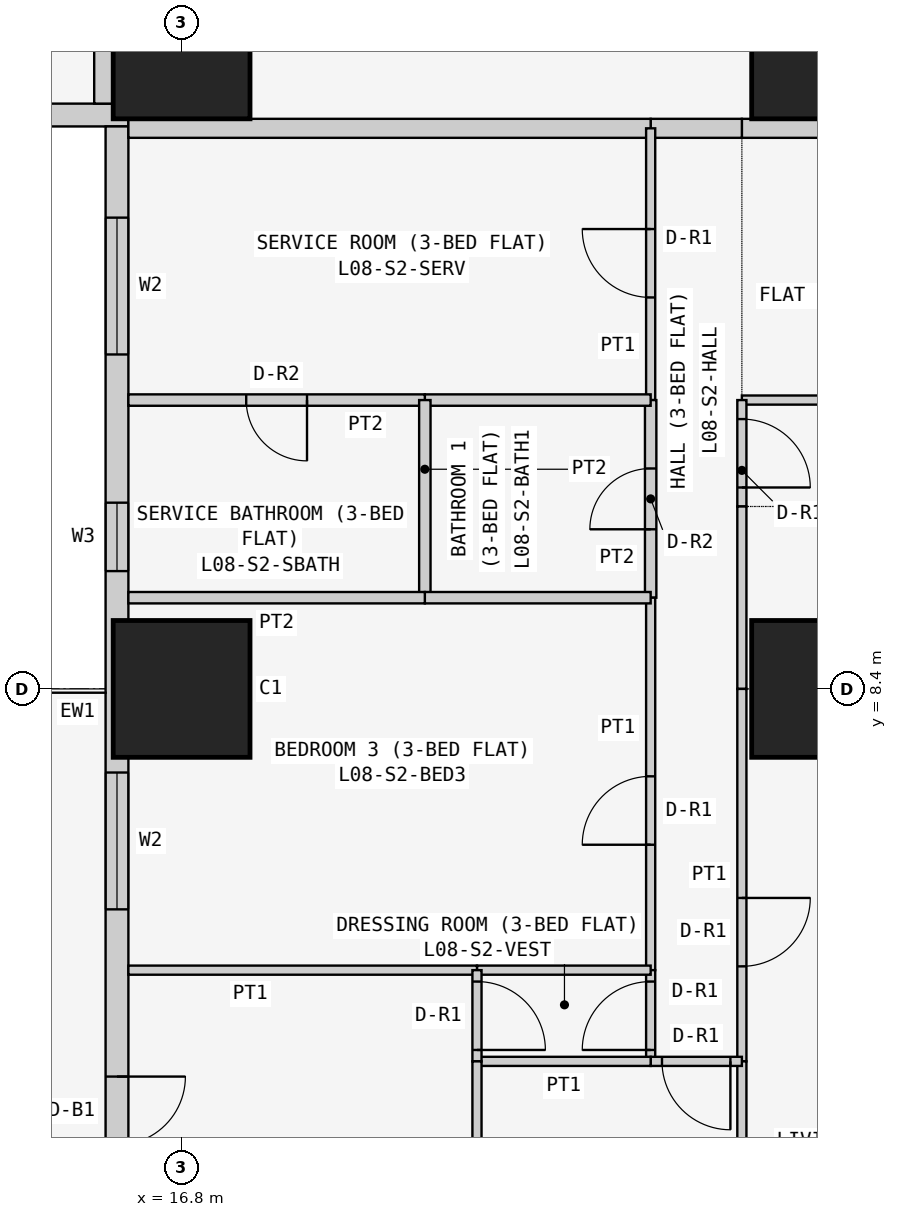
"""IFC4 building model, lengths in metres.
Left out: names, types, materials, properties, quantities, classifications, styles, units other than length and angle.
Written with IfcOpenShell. Run it as: python <this file> out.ifc"""

import sys

from ifc_helpers import new_model, si_unit, direction, frame, frame_2d, origin, origin_2d, place, context, subcontext, project, spatial, rectangle, extrude, element, fill, save


model = new_model("IFC4")
c1 = context("Model", 3, precision=1e-05, world=origin(), true_north=direction((0.0, 1.0)))
c2 = subcontext(c1, "Body", "Model", "MODEL_VIEW")
j1 = project(units=[si_unit("LENGTHUNIT", "METRE"), si_unit("PLANEANGLEUNIT", "RADIAN")], contexts=[c1])
p1 = place(None, origin())
s1 = spatial("IfcSite", under=j1, at=p1, CompositionType="ELEMENT")
p2 = place(p1, origin())
s2 = spatial("IfcBuilding", under=s1, at=p2, CompositionType="ELEMENT")
p3 = place(p2, frame((0.0, 0.0, 38.1)))
s3 = spatial("IfcBuildingStorey", under=s2, at=p3, CompositionType="ELEMENT", Elevation=38.1)
for number, where, z_axis, x_axis in (
    (1, (16.8, 8.4, 0.0), (0.0, 0.0, 1.0), (1.0, 0.0, 0.0)),
    (2, (16.8, 16.8, 0.0), (0.0, 0.0, 1.0), (1.0, 0.0, 0.0)),
    (3, (25.2, 8.4, 0.0), (0.0, 0.0, 1.0), (1.0, 0.0, 0.0)),
    (4, (25.2, 16.8, 0.0), (0.0, 0.0, 1.0), (1.0, 0.0, 0.0)),
):
    element("IfcColumn", number, at=place(p3, frame(where, z_axis=z_axis, x_axis=x_axis)), inside=s3, PredefinedType="COLUMN", context=c2, shape_type="SweptSolid", body=[
        extrude(rectangle(XDim=1.8, YDim=1.8, at=origin_2d()), origin(), (0.0, 0.0, 1.0), 3.6),
    ])
p4 = place(p3, frame((0.4, 15.95, 0.0), z_axis=(0.0, 0.0, 1.0), x_axis=(1.0, 0.0, 0.0)))
e5 = element("IfcWall", 5, at=p4, inside=s3, PredefinedType="SOLIDWALL", context=c2, shape_type="SweptSolid", body=[
    extrude(rectangle(XDim=15.7, YDim=0.3, at=frame_2d((7.85, 0.0))), origin(), (0.0, 0.0, 1.0), 3.45),
])
p5 = place(p4, frame((12.4, 0.0, 0.9)))
e6 = element("IfcOpeningElement", 6, at=p5, cuts=e5, PredefinedType="OPENING", context=c2, shape_type="SweptSolid", body=[
    extrude(rectangle(XDim=1.8, YDim=1.5, at=frame_2d((0.9, 0.75))), frame((0.0, 0.16, 0.0), z_axis=(0.0, -1.0, 0.0), x_axis=(1.0, 0.0, 0.0)), (0.0, 0.0, 1.0), 0.32),
])
p6 = place(p4, frame((9.55, 0.0, 1.5)))
e7 = element("IfcOpeningElement", 7, at=p6, cuts=e5, PredefinedType="OPENING", context=c2, shape_type="SweptSolid", body=[
    extrude(rectangle(XDim=0.9, YDim=0.7, at=frame_2d((0.45, 0.35))), frame((0.0, 0.16, 0.0), z_axis=(0.0, -1.0, 0.0), x_axis=(1.0, 0.0, 0.0)), (0.0, 0.0, 1.0), 0.32),
])
p7 = place(p4, frame((5.1, 0.0, 0.9)))
e8 = element("IfcOpeningElement", 8, at=p7, cuts=e5, PredefinedType="OPENING", context=c2, shape_type="SweptSolid", body=[
    extrude(rectangle(XDim=1.8, YDim=1.5, at=frame_2d((0.9, 0.75))), frame((0.0, 0.16, 0.0), z_axis=(0.0, -1.0, 0.0), x_axis=(1.0, 0.0, 0.0)), (0.0, 0.0, 1.0), 0.32),
])
p8 = place(p4, frame((2.0, 0.0, 0.0)))
e9 = element("IfcOpeningElement", 9, at=p8, cuts=e5, PredefinedType="OPENING", context=c2, shape_type="SweptSolid", body=[
    extrude(rectangle(XDim=0.9, YDim=2.4, at=frame_2d((0.45, 1.2))), frame((0.0, 0.16, 0.0), z_axis=(0.0, -1.0, 0.0), x_axis=(1.0, 0.0, 0.0)), (0.0, 0.0, 1.0), 0.32),
])
p9 = place(p4, frame((0.7, 0.0, 0.9)))
e10 = element("IfcOpeningElement", 10, at=p9, cuts=e5, PredefinedType="OPENING", context=c2, shape_type="SweptSolid", body=[
    extrude(rectangle(XDim=1.2, YDim=1.5, at=frame_2d((0.6, 0.75))), frame((0.0, 0.16, 0.0), z_axis=(0.0, -1.0, 0.0), x_axis=(1.0, 0.0, 0.0)), (0.0, 0.0, 1.0), 0.32),
])
p10 = place(p3, frame((15.95, 15.8, 0.0), z_axis=(0.0, 0.0, 1.0), x_axis=(0.0, -1.0, 0.0)))
e11 = element("IfcWall", 11, at=p10, inside=s3, PredefinedType="SOLIDWALL", context=c2, shape_type="SweptSolid", body=[
    extrude(rectangle(XDim=15.4, YDim=0.3, at=frame_2d((7.7, 0.0))), origin(), (0.0, 0.0, 1.0), 3.45),
])
p11 = place(p10, frame((1.2, 0.0, 0.9)))
e12 = element("IfcOpeningElement", 12, at=p11, cuts=e11, PredefinedType="OPENING", context=c2, shape_type="SweptSolid", body=[
    extrude(rectangle(XDim=1.8, YDim=1.5, at=frame_2d((0.9, 0.75))), frame((0.0, 0.16, 0.0), z_axis=(0.0, -1.0, 0.0), x_axis=(1.0, 0.0, 0.0)), (0.0, 0.0, 1.0), 0.32),
])
p12 = place(p10, frame((4.95, 0.0, 1.5)))
e13 = element("IfcOpeningElement", 13, at=p12, cuts=e11, PredefinedType="OPENING", context=c2, shape_type="SweptSolid", body=[
    extrude(rectangle(XDim=0.9, YDim=0.7, at=frame_2d((0.45, 0.35))), frame((0.0, 0.16, 0.0), z_axis=(0.0, -1.0, 0.0), x_axis=(1.0, 0.0, 0.0)), (0.0, 0.0, 1.0), 0.32),
])
p13 = place(p10, frame((8.5, 0.0, 0.9)))
e14 = element("IfcOpeningElement", 14, at=p13, cuts=e11, PredefinedType="OPENING", context=c2, shape_type="SweptSolid", body=[
    extrude(rectangle(XDim=1.8, YDim=1.5, at=frame_2d((0.9, 0.75))), frame((0.0, 0.16, 0.0), z_axis=(0.0, -1.0, 0.0), x_axis=(1.0, 0.0, 0.0)), (0.0, 0.0, 1.0), 0.32),
])
p14 = place(p10, frame((12.5, 0.0, 0.0)))
e15 = element("IfcOpeningElement", 15, at=p14, cuts=e11, PredefinedType="OPENING", context=c2, shape_type="SweptSolid", body=[
    extrude(rectangle(XDim=0.9, YDim=2.4, at=frame_2d((0.45, 1.2))), frame((0.0, 0.16, 0.0), z_axis=(0.0, -1.0, 0.0), x_axis=(1.0, 0.0, 0.0)), (0.0, 0.0, 1.0), 0.32),
])
p15 = place(p10, frame((13.5, 0.0, 0.9)))
e16 = element("IfcOpeningElement", 16, at=p15, cuts=e11, PredefinedType="OPENING", context=c2, shape_type="SweptSolid", body=[
    extrude(rectangle(XDim=1.2, YDim=1.5, at=frame_2d((0.6, 0.75))), frame((0.0, 0.16, 0.0), z_axis=(0.0, -1.0, 0.0), x_axis=(1.0, 0.0, 0.0)), (0.0, 0.0, 1.0), 0.32),
])
p16 = place(p3, frame((29.4, 15.775, 0.0), z_axis=(0.0, 0.0, 1.0), x_axis=(-1.0, 0.0, 0.0)))
e17 = element("IfcWall", 17, at=p16, inside=s3, PredefinedType="PARTITIONING", context=c2, shape_type="SweptSolid", body=[
    extrude(rectangle(XDim=5.229, YDim=0.25, at=frame_2d((2.615, 0.0))), origin(), (0.0, 0.0, 1.0), 3.45),
])
p17 = place(p16, frame((2.1, 0.0, 0.0)))
e18 = element("IfcOpeningElement", 18, at=p17, cuts=e17, PredefinedType="OPENING", context=c2, shape_type="SweptSolid", body=[
    extrude(rectangle(XDim=1.0, YDim=2.1, at=frame_2d((0.5, 1.05))), frame((0.0, 0.135, 0.0), z_axis=(0.0, -1.0, 0.0), x_axis=(1.0, 0.0, 0.0)), (0.0, 0.0, 1.0), 0.27),
])
p18 = place(p3, frame((24.171, 15.775, 0.0), z_axis=(0.0, 0.0, 1.0), x_axis=(-1.0, 0.0, 0.0)))
e19 = element("IfcWall", 19, at=p18, inside=s3, PredefinedType="PARTITIONING", context=c2, shape_type="SweptSolid", body=[
    extrude(rectangle(XDim=1.2, YDim=0.25, at=frame_2d((0.6, 0.0))), origin(), (0.0, 0.0, 1.0), 3.45),
])
for number, where, z_axis, x_axis in (
    (20, (22.971, 15.775, 0.0), (0.0, 0.0, 1.0), (-1.0, 0.0, 0.0)),
    (21, (15.775, 16.1, 0.0), (0.0, 0.0, 1.0), (0.0, 1.0, 0.0)),
):
    element("IfcWall", number, at=place(p3, frame(where, z_axis=z_axis, x_axis=x_axis)), inside=s3, PredefinedType="PARTITIONING", context=c2, shape_type="SweptSolid", body=[
        extrude(rectangle(XDim=6.871, YDim=0.25, at=frame_2d((3.436, 0.0))), origin(), (0.0, 0.0, 1.0), 3.45),
    ])
p19 = place(p3, frame((29.4, 12.2, 0.0), z_axis=(0.0, 0.0, 1.0), x_axis=(-1.0, 0.0, 0.0)))
e22 = element("IfcWall", 22, at=p19, inside=s3, PredefinedType="PARTITIONING", context=c2, shape_type="SweptSolid", body=[
    extrude(rectangle(XDim=5.229, YDim=0.12, at=frame_2d((2.615, 0.0))), origin(), (0.0, 0.0, 1.0), 3.45),
])
p20 = place(p3, frame((24.171, 10.8, 0.0), z_axis=(0.0, 0.0, 1.0), x_axis=(0.0, 1.0, 0.0)))
e23 = element("IfcWall", 23, at=p20, inside=s3, PredefinedType="PARTITIONING", context=c2, shape_type="SweptSolid", body=[
    extrude(rectangle(XDim=1.4, YDim=0.12, at=frame_2d((0.7, 0.0))), origin(), (0.0, 0.0, 1.0), 3.45),
])
p21 = place(p20, frame((0.25, 0.0, 0.0)))
e24 = element("IfcOpeningElement", 24, at=p21, cuts=e23, PredefinedType="OPENING", context=c2, shape_type="SweptSolid", body=[
    extrude(rectangle(XDim=0.9, YDim=2.1, at=frame_2d((0.45, 1.05))), frame((0.0, 0.07, 0.0), z_axis=(0.0, -1.0, 0.0), x_axis=(1.0, 0.0, 0.0)), (0.0, 0.0, 1.0), 0.14),
])
p22 = place(p3, frame((24.171, 8.4, 0.0), z_axis=(0.0, 0.0, 1.0), x_axis=(0.0, 1.0, 0.0)))
e25 = element("IfcWall", 25, at=p22, inside=s3, PredefinedType="PARTITIONING", context=c2, shape_type="SweptSolid", body=[
    extrude(rectangle(XDim=2.4, YDim=0.12, at=frame_2d((1.2, 0.0))), origin(), (0.0, 0.0, 1.0), 3.45),
])
p23 = place(p3, frame((24.171, 3.5, 0.0), z_axis=(0.0, 0.0, 1.0), x_axis=(0.0, 1.0, 0.0)))
e26 = element("IfcWall", 26, at=p23, inside=s3, PredefinedType="PARTITIONING", context=c2, shape_type="SweptSolid", body=[
    extrude(rectangle(XDim=4.9, YDim=0.12, at=frame_2d((2.45, 0.0))), origin(), (0.0, 0.0, 1.0), 3.45),
])
p24 = place(p23, frame((1.25, 0.0, 0.0)))
e27 = element("IfcOpeningElement", 27, at=p24, cuts=e26, PredefinedType="OPENING", context=c2, shape_type="SweptSolid", body=[
    extrude(rectangle(XDim=0.9, YDim=2.1, at=frame_2d((0.45, 1.05))), frame((0.0, 0.07, 0.0), z_axis=(0.0, -1.0, 0.0), x_axis=(1.0, 0.0, 0.0)), (0.0, 0.0, 1.0), 0.14),
])
p25 = place(p3, frame((24.171, -0.65, 0.0), z_axis=(0.0, 0.0, 1.0), x_axis=(0.0, 1.0, 0.0)))
e28 = element("IfcWall", 28, at=p25, inside=s3, PredefinedType="PARTITIONING", context=c2, shape_type="SweptSolid", body=[
    extrude(rectangle(XDim=4.15, YDim=0.12, at=frame_2d((2.075, 0.0))), origin(), (0.0, 0.0, 1.0), 3.45),
])
p26 = place(p3, frame((22.971, 12.2, 0.0), z_axis=(0.0, 0.0, 1.0), x_axis=(0.0, 1.0, 0.0)))
e29 = element("IfcWall", 29, at=p26, inside=s3, PredefinedType="PARTITIONING", context=c2, shape_type="SweptSolid", body=[
    extrude(rectangle(XDim=3.575, YDim=0.12, at=frame_2d((1.788, 0.0))), origin(), (0.0, 0.0, 1.0), 3.45),
])
p27 = place(p26, frame((1.35, 0.0, 0.0)))
e30 = element("IfcOpeningElement", 30, at=p27, cuts=e29, PredefinedType="OPENING", context=c2, shape_type="SweptSolid", body=[
    extrude(rectangle(XDim=0.9, YDim=2.1, at=frame_2d((0.45, 1.05))), frame((0.0, 0.07, 0.0), z_axis=(0.0, -1.0, 0.0), x_axis=(1.0, 0.0, 0.0)), (0.0, 0.0, 1.0), 0.14),
])
p28 = place(p3, frame((22.971, 9.6, 0.0), z_axis=(0.0, 0.0, 1.0), x_axis=(0.0, 1.0, 0.0)))
e31 = element("IfcWall", 31, at=p28, inside=s3, PredefinedType="PARTITIONING", context=c2, shape_type="SweptSolid", body=[
    extrude(rectangle(XDim=2.6, YDim=0.15, at=frame_2d((1.3, 0.0))), origin(), (0.0, 0.0, 1.0), 3.45),
])
p29 = place(p28, frame((0.9, 0.0, 0.0)))
e32 = element("IfcOpeningElement", 32, at=p29, cuts=e31, PredefinedType="OPENING", context=c2, shape_type="SweptSolid", body=[
    extrude(rectangle(XDim=0.8, YDim=2.1, at=frame_2d((0.4, 1.05))), frame((0.0, 0.085, 0.0), z_axis=(0.0, -1.0, 0.0), x_axis=(1.0, 0.0, 0.0)), (0.0, 0.0, 1.0), 0.17),
])
p30 = place(p3, frame((22.971, 4.7, 0.0), z_axis=(0.0, 0.0, 1.0), x_axis=(0.0, 1.0, 0.0)))
e33 = element("IfcWall", 33, at=p30, inside=s3, PredefinedType="PARTITIONING", context=c2, shape_type="SweptSolid", body=[
    extrude(rectangle(XDim=4.9, YDim=0.12, at=frame_2d((2.45, 0.0))), origin(), (0.0, 0.0, 1.0), 3.45),
])
p31 = place(p30, frame((1.65, 0.0, 0.0)))
e34 = element("IfcOpeningElement", 34, at=p31, cuts=e33, PredefinedType="OPENING", context=c2, shape_type="SweptSolid", body=[
    extrude(rectangle(XDim=0.9, YDim=2.1, at=frame_2d((0.45, 1.05))), frame((0.0, 0.07, 0.0), z_axis=(0.0, -1.0, 0.0), x_axis=(1.0, 0.0, 0.0)), (0.0, 0.0, 1.0), 0.14),
])
p32 = place(p3, frame((22.971, 3.5, 0.0), z_axis=(0.0, 0.0, 1.0), x_axis=(0.0, 1.0, 0.0)))
e35 = element("IfcWall", 35, at=p32, inside=s3, PredefinedType="PARTITIONING", context=c2, shape_type="SweptSolid", body=[
    extrude(rectangle(XDim=1.2, YDim=0.12, at=frame_2d((0.6, 0.0))), origin(), (0.0, 0.0, 1.0), 3.45),
])
p33 = place(p32, frame((0.15, 0.0, 0.0)))
e36 = element("IfcOpeningElement", 36, at=p33, cuts=e35, PredefinedType="OPENING", context=c2, shape_type="SweptSolid", body=[
    extrude(rectangle(XDim=0.9, YDim=2.1, at=frame_2d((0.45, 1.05))), frame((0.0, 0.07, 0.0), z_axis=(0.0, -1.0, 0.0), x_axis=(1.0, 0.0, 0.0)), (0.0, 0.0, 1.0), 0.14),
])
p34 = place(p3, frame((24.171, 3.5, 0.0), z_axis=(0.0, 0.0, 1.0), x_axis=(-1.0, 0.0, 0.0)))
e37 = element("IfcWall", 37, at=p34, inside=s3, PredefinedType="PARTITIONING", context=c2, shape_type="SweptSolid", body=[
    extrude(rectangle(XDim=1.2, YDim=0.12, at=frame_2d((0.6, 0.0))), origin(), (0.0, 0.0, 1.0), 3.45),
])
p35 = place(p34, frame((0.151, 0.0, 0.0)))
e38 = element("IfcOpeningElement", 38, at=p35, cuts=e37, PredefinedType="OPENING", context=c2, shape_type="SweptSolid", body=[
    extrude(rectangle(XDim=0.9, YDim=2.1, at=frame_2d((0.45, 1.05))), frame((0.0, 0.07, 0.0), z_axis=(0.0, -1.0, 0.0), x_axis=(1.0, 0.0, 0.0)), (0.0, 0.0, 1.0), 0.14),
])
p36 = place(p3, frame((22.971, 12.2, 0.0), z_axis=(0.0, 0.0, 1.0), x_axis=(-1.0, 0.0, 0.0)))
e39 = element("IfcWall", 39, at=p36, inside=s3, PredefinedType="PARTITIONING", context=c2, shape_type="SweptSolid", body=[
    extrude(rectangle(XDim=2.971, YDim=0.15, at=frame_2d((1.485, 0.0))), origin(), (0.0, 0.0, 1.0), 3.45),
])
p37 = place(p3, frame((20.0, 12.2, 0.0), z_axis=(0.0, 0.0, 1.0), x_axis=(-1.0, 0.0, 0.0)))
e40 = element("IfcWall", 40, at=p37, inside=s3, PredefinedType="PARTITIONING", context=c2, shape_type="SweptSolid", body=[
    extrude(rectangle(XDim=3.9, YDim=0.15, at=frame_2d((1.95, 0.0))), origin(), (0.0, 0.0, 1.0), 3.45),
])
p38 = place(p37, frame((1.55, 0.0, 0.0)))
e41 = element("IfcOpeningElement", 41, at=p38, cuts=e40, PredefinedType="OPENING", context=c2, shape_type="SweptSolid", body=[
    extrude(rectangle(XDim=0.8, YDim=2.1, at=frame_2d((0.4, 1.05))), frame((0.0, 0.085, 0.0), z_axis=(0.0, -1.0, 0.0), x_axis=(1.0, 0.0, 0.0)), (0.0, 0.0, 1.0), 0.17),
])
p39 = place(p3, frame((20.0, 9.6, 0.0), z_axis=(0.0, 0.0, 1.0), x_axis=(0.0, 1.0, 0.0)))
e42 = element("IfcWall", 42, at=p39, inside=s3, PredefinedType="PARTITIONING", context=c2, shape_type="SweptSolid", body=[
    extrude(rectangle(XDim=2.6, YDim=0.15, at=frame_2d((1.3, 0.0))), origin(), (0.0, 0.0, 1.0), 3.45),
])
p40 = place(p3, frame((22.971, 9.6, 0.0), z_axis=(0.0, 0.0, 1.0), x_axis=(-1.0, 0.0, 0.0)))
e43 = element("IfcWall", 43, at=p40, inside=s3, PredefinedType="PARTITIONING", context=c2, shape_type="SweptSolid", body=[
    extrude(rectangle(XDim=2.971, YDim=0.15, at=frame_2d((1.485, 0.0))), origin(), (0.0, 0.0, 1.0), 3.45),
])
p41 = place(p3, frame((20.0, 9.6, 0.0), z_axis=(0.0, 0.0, 1.0), x_axis=(-1.0, 0.0, 0.0)))
e44 = element("IfcWall", 44, at=p41, inside=s3, PredefinedType="PARTITIONING", context=c2, shape_type="SweptSolid", body=[
    extrude(rectangle(XDim=3.9, YDim=0.15, at=frame_2d((1.95, 0.0))), origin(), (0.0, 0.0, 1.0), 3.45),
])
p42 = place(p3, frame((22.971, 4.7, 0.0), z_axis=(0.0, 0.0, 1.0), x_axis=(-1.0, 0.0, 0.0)))
e45 = element("IfcWall", 45, at=p42, inside=s3, PredefinedType="PARTITIONING", context=c2, shape_type="SweptSolid", body=[
    extrude(rectangle(XDim=2.285, YDim=0.12, at=frame_2d((1.143, 0.0))), origin(), (0.0, 0.0, 1.0), 3.45),
])
p43 = place(p3, frame((20.686, 4.7, 0.0), z_axis=(0.0, 0.0, 1.0), x_axis=(-1.0, 0.0, 0.0)))
e46 = element("IfcWall", 46, at=p43, inside=s3, PredefinedType="PARTITIONING", context=c2, shape_type="SweptSolid", body=[
    extrude(rectangle(XDim=4.586, YDim=0.12, at=frame_2d((2.293, 0.0))), origin(), (0.0, 0.0, 1.0), 3.45),
])
p44 = place(p3, frame((22.971, 3.5, 0.0), z_axis=(0.0, 0.0, 1.0), x_axis=(-1.0, 0.0, 0.0)))
e47 = element("IfcWall", 47, at=p44, inside=s3, PredefinedType="PARTITIONING", context=c2, shape_type="SweptSolid", body=[
    extrude(rectangle(XDim=2.285, YDim=0.12, at=frame_2d((1.143, 0.0))), origin(), (0.0, 0.0, 1.0), 3.45),
])
p45 = place(p3, frame((20.686, 3.5, 0.0), z_axis=(0.0, 0.0, 1.0), x_axis=(0.0, 1.0, 0.0)))
e48 = element("IfcWall", 48, at=p45, inside=s3, PredefinedType="PARTITIONING", context=c2, shape_type="SweptSolid", body=[
    extrude(rectangle(XDim=1.2, YDim=0.12, at=frame_2d((0.6, 0.0))), origin(), (0.0, 0.0, 1.0), 3.45),
])
p46 = place(p45, frame((0.15, 0.0, 0.0)))
e49 = element("IfcOpeningElement", 49, at=p46, cuts=e48, PredefinedType="OPENING", context=c2, shape_type="SweptSolid", body=[
    extrude(rectangle(XDim=0.9, YDim=2.1, at=frame_2d((0.45, 1.05))), frame((0.0, 0.07, 0.0), z_axis=(0.0, -1.0, 0.0), x_axis=(1.0, 0.0, 0.0)), (0.0, 0.0, 1.0), 0.14),
])
p47 = place(p3, frame((20.686, -0.65, 0.0), z_axis=(0.0, 0.0, 1.0), x_axis=(0.0, 1.0, 0.0)))
e50 = element("IfcWall", 50, at=p47, inside=s3, PredefinedType="PARTITIONING", context=c2, shape_type="SweptSolid", body=[
    extrude(rectangle(XDim=4.15, YDim=0.12, at=frame_2d((2.075, 0.0))), origin(), (0.0, 0.0, 1.0), 3.45),
])
p48 = place(p11, origin())
e51 = element("IfcWindow", 51, at=p48, inside=s3, PartitioningType="SINGLE_PANEL", PredefinedType="WINDOW", context=c2, shape_type="SweptSolid", body=[
    extrude(rectangle(XDim=1.8, YDim=1.5, at=frame_2d((0.9, 0.75))), frame((0.0, 0.03, 0.0), z_axis=(0.0, -1.0, 0.0), x_axis=(1.0, 0.0, 0.0)), (0.0, 0.0, 1.0), 0.06),
])
fill(e12, e51)
p49 = place(p12, origin())
e52 = element("IfcWindow", 52, at=p49, inside=s3, PartitioningType="SINGLE_PANEL", PredefinedType="WINDOW", context=c2, shape_type="SweptSolid", body=[
    extrude(rectangle(XDim=0.9, YDim=0.7, at=frame_2d((0.45, 0.35))), frame((0.0, 0.03, 0.0), z_axis=(0.0, -1.0, 0.0), x_axis=(1.0, 0.0, 0.0)), (0.0, 0.0, 1.0), 0.06),
])
fill(e13, e52)
p50 = place(p13, origin())
e53 = element("IfcWindow", 53, at=p50, inside=s3, PartitioningType="SINGLE_PANEL", PredefinedType="WINDOW", context=c2, shape_type="SweptSolid", body=[
    extrude(rectangle(XDim=1.8, YDim=1.5, at=frame_2d((0.9, 0.75))), frame((0.0, 0.03, 0.0), z_axis=(0.0, -1.0, 0.0), x_axis=(1.0, 0.0, 0.0)), (0.0, 0.0, 1.0), 0.06),
])
fill(e14, e53)
p51 = place(p14, origin())
e54 = element("IfcDoor", 54, at=p51, inside=s3, OperationType="SINGLE_SWING_LEFT", PredefinedType="DOOR", context=c2, shape_type="SweptSolid", body=[
    extrude(rectangle(XDim=0.9, YDim=2.4, at=frame_2d((0.45, 1.2))), frame((0.0, 0.025, 0.0), z_axis=(0.0, -1.0, 0.0), x_axis=(1.0, 0.0, 0.0)), (0.0, 0.0, 1.0), 0.05),
])
fill(e15, e54)
p52 = place(p21, frame((0.9, 0.0, 0.0), z_axis=(0.0, 0.0, 1.0), x_axis=(-1.0, 0.0, 0.0)))
e55 = element("IfcDoor", 55, at=p52, inside=s3, OperationType="SINGLE_SWING_RIGHT", PredefinedType="DOOR", context=c2, shape_type="SweptSolid", body=[
    extrude(rectangle(XDim=0.9, YDim=2.1, at=frame_2d((0.45, 1.05))), frame((0.0, 0.025, 0.0), z_axis=(0.0, -1.0, 0.0), x_axis=(1.0, 0.0, 0.0)), (0.0, 0.0, 1.0), 0.05),
])
fill(e24, e55)
p53 = place(p24, frame((0.9, 0.0, 0.0), z_axis=(0.0, 0.0, 1.0), x_axis=(-1.0, 0.0, 0.0)))
e56 = element("IfcDoor", 56, at=p53, inside=s3, OperationType="SINGLE_SWING_LEFT", PredefinedType="DOOR", context=c2, shape_type="SweptSolid", body=[
    extrude(rectangle(XDim=0.9, YDim=2.1, at=frame_2d((0.45, 1.05))), frame((0.0, 0.025, 0.0), z_axis=(0.0, -1.0, 0.0), x_axis=(1.0, 0.0, 0.0)), (0.0, 0.0, 1.0), 0.05),
])
fill(e27, e56)
p54 = place(p27, origin())
e57 = element("IfcDoor", 57, at=p54, inside=s3, OperationType="SINGLE_SWING_RIGHT", PredefinedType="DOOR", context=c2, shape_type="SweptSolid", body=[
    extrude(rectangle(XDim=0.9, YDim=2.1, at=frame_2d((0.45, 1.05))), frame((0.0, 0.025, 0.0), z_axis=(0.0, -1.0, 0.0), x_axis=(1.0, 0.0, 0.0)), (0.0, 0.0, 1.0), 0.05),
])
fill(e30, e57)
p55 = place(p38, origin())
e58 = element("IfcDoor", 58, at=p55, inside=s3, OperationType="SINGLE_SWING_LEFT", PredefinedType="DOOR", context=c2, shape_type="SweptSolid", body=[
    extrude(rectangle(XDim=0.8, YDim=2.1, at=frame_2d((0.4, 1.05))), frame((0.0, 0.025, 0.0), z_axis=(0.0, -1.0, 0.0), x_axis=(1.0, 0.0, 0.0)), (0.0, 0.0, 1.0), 0.05),
])
fill(e41, e58)
p56 = place(p29, origin())
e59 = element("IfcDoor", 59, at=p56, inside=s3, OperationType="SINGLE_SWING_LEFT", PredefinedType="DOOR", context=c2, shape_type="SweptSolid", body=[
    extrude(rectangle(XDim=0.8, YDim=2.1, at=frame_2d((0.4, 1.05))), frame((0.0, 0.025, 0.0), z_axis=(0.0, -1.0, 0.0), x_axis=(1.0, 0.0, 0.0)), (0.0, 0.0, 1.0), 0.05),
])
fill(e32, e59)
p57 = place(p31, origin())
e60 = element("IfcDoor", 60, at=p57, inside=s3, OperationType="SINGLE_SWING_LEFT", PredefinedType="DOOR", context=c2, shape_type="SweptSolid", body=[
    extrude(rectangle(XDim=0.9, YDim=2.1, at=frame_2d((0.45, 1.05))), frame((0.0, 0.025, 0.0), z_axis=(0.0, -1.0, 0.0), x_axis=(1.0, 0.0, 0.0)), (0.0, 0.0, 1.0), 0.05),
])
fill(e34, e60)
p58 = place(p33, origin())
e61 = element("IfcDoor", 61, at=p58, inside=s3, OperationType="SINGLE_SWING_LEFT", PredefinedType="DOOR", context=c2, shape_type="SweptSolid", body=[
    extrude(rectangle(XDim=0.9, YDim=2.1, at=frame_2d((0.45, 1.05))), frame((0.0, 0.025, 0.0), z_axis=(0.0, -1.0, 0.0), x_axis=(1.0, 0.0, 0.0)), (0.0, 0.0, 1.0), 0.05),
])
fill(e36, e61)
p59 = place(p46, frame((0.9, 0.0, 0.0), z_axis=(0.0, 0.0, 1.0), x_axis=(-1.0, 0.0, 0.0)))
e62 = element("IfcDoor", 62, at=p59, inside=s3, OperationType="SINGLE_SWING_RIGHT", PredefinedType="DOOR", context=c2, shape_type="SweptSolid", body=[
    extrude(rectangle(XDim=0.9, YDim=2.1, at=frame_2d((0.45, 1.05))), frame((0.0, 0.025, 0.0), z_axis=(0.0, -1.0, 0.0), x_axis=(1.0, 0.0, 0.0)), (0.0, 0.0, 1.0), 0.05),
])
fill(e49, e62)
p60 = place(p35, origin())
e63 = element("IfcDoor", 63, at=p60, inside=s3, OperationType="SINGLE_SWING_LEFT", PredefinedType="DOOR", context=c2, shape_type="SweptSolid", body=[
    extrude(rectangle(XDim=0.9, YDim=2.1, at=frame_2d((0.45, 1.05))), frame((0.0, 0.025, 0.0), z_axis=(0.0, -1.0, 0.0), x_axis=(1.0, 0.0, 0.0)), (0.0, 0.0, 1.0), 0.05),
])
fill(e38, e63)
save(model, sys.argv[1])
